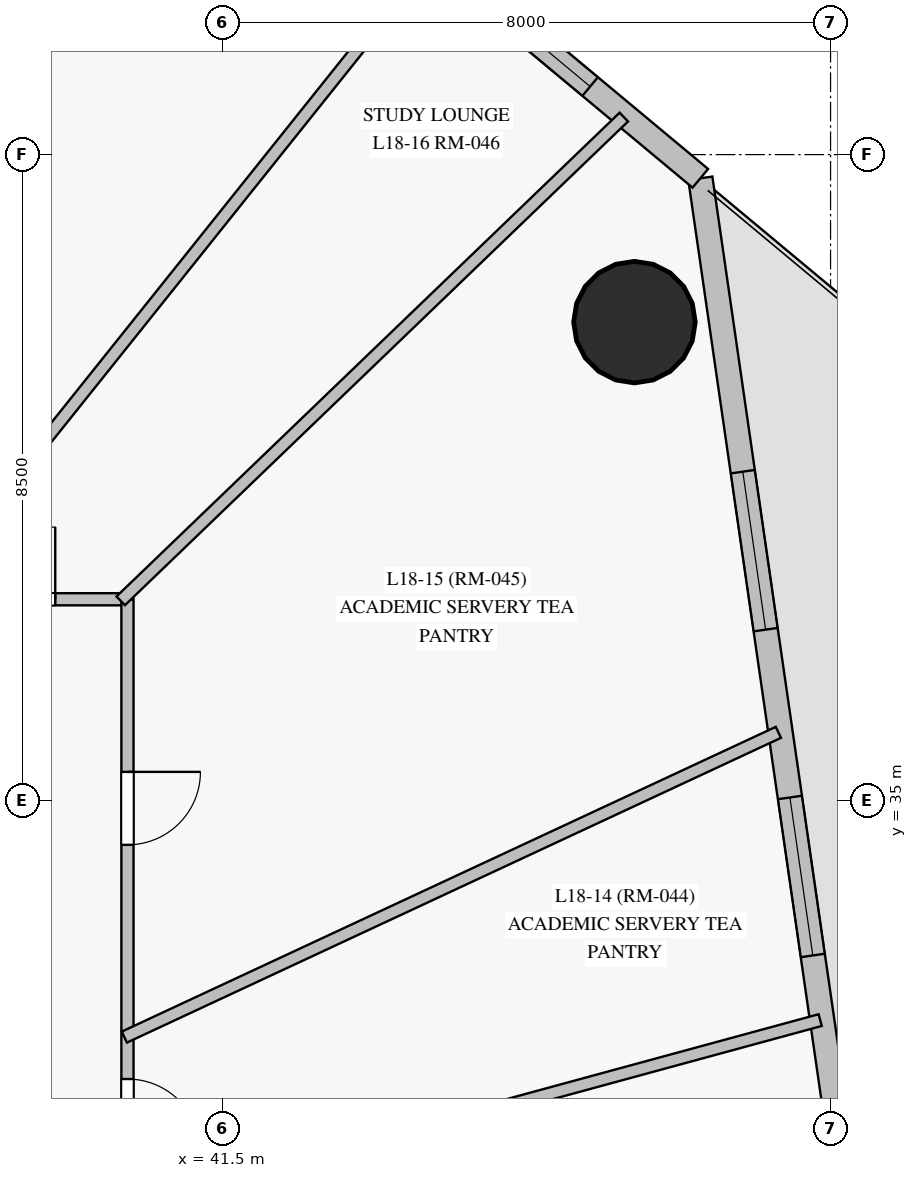
"""IFC4 building model, lengths in metres.
Left out: names, types, materials, properties, quantities, classifications, styles, units other than length and angle.
Written with IfcOpenShell. Run it as: python <this file> out.ifc"""

import sys

from ifc_helpers import new_model, si_unit, direction, frame, frame_2d, origin, origin_with_axes, origin_2d, place, context, subcontext, project, spatial, rectangle, circle, extrude, source, transform, mapped, element, fill, save


model = new_model("IFC4")
c1 = context("Model", 3, precision=1e-05, world=origin(), true_north=direction((0.0, 1.0)))
c2 = subcontext(c1, "Body", "Model", "MODEL_VIEW")
j1 = project(units=[si_unit("LENGTHUNIT", "METRE"), si_unit("PLANEANGLEUNIT", "RADIAN")], contexts=[c1])
p1 = place(None, origin())
s1 = spatial("IfcSite", under=j1, at=p1, CompositionType="ELEMENT")
p2 = place(p1, origin())
s2 = spatial("IfcBuilding", under=s1, at=p2, CompositionType="ELEMENT")
p3 = place(p2, frame((0.0, 0.0, 69.7)))
s3 = spatial("IfcBuildingStorey", under=s2, at=p3, CompositionType="ELEMENT", Elevation=69.7)
m1 = source(origin_with_axes(), c2, "Body", "SweptSolid", [
    extrude(circle(Radius=0.8, at=origin_2d()), origin(), (0.0, 0.0, 1.0), 3.6),
])
p4 = place(p3, frame((46.92, 41.296, 0.0), z_axis=(0.0, 0.0, 1.0), x_axis=(1.0, 0.0, 0.0)))
e1 = element("IfcColumn", 1, at=p4, inside=s3, PredefinedType="COLUMN", context=c2, shape_type="MappedRepresentation", body=[
    mapped(m1, transform((0.0, 0.0, 0.0), scale=1.0)),
])
p5 = place(p3, frame((50.351, 25.464, 0.0), z_axis=(0.0, 0.0, 1.0), x_axis=(-0.14319608419, 0.989694337396, 0.0)))
e2 = element("IfcWall", 2, at=p5, inside=s3, PredefinedType="SOLIDWALL", context=c2, shape_type="SweptSolid", body=[
    extrude(rectangle(XDim=17.909, YDim=0.32, at=frame_2d((8.954, 0.0))), origin(), (0.0, 0.0, 1.0), 3.35),
])
p6 = place(p5, frame((7.578, 0.0, 0.85)))
e3 = element("IfcOpeningElement", 3, at=p6, cuts=e2, PredefinedType="OPENING", context=c2, shape_type="SweptSolid", body=[
    extrude(rectangle(XDim=2.1, YDim=1.95, at=frame_2d((1.05, 0.975))), frame((0.0, 0.17, 0.0), z_axis=(0.0, -1.0, 0.0), x_axis=(1.0, 0.0, 0.0)), (0.0, 0.0, 1.0), 0.34),
])
p7 = place(p5, frame((11.909, 0.0, 0.85)))
e4 = element("IfcOpeningElement", 4, at=p7, cuts=e2, PredefinedType="OPENING", context=c2, shape_type="SweptSolid", body=[
    extrude(rectangle(XDim=2.1, YDim=1.95, at=frame_2d((1.05, 0.975))), frame((0.0, 0.17, 0.0), z_axis=(0.0, -1.0, 0.0), x_axis=(1.0, 0.0, 0.0)), (0.0, 0.0, 1.0), 0.34),
])
p8 = place(p5, frame((1.714, 0.0, 0.0)))
e5 = element("IfcOpeningElement", 5, at=p8, cuts=e2, PredefinedType="OPENING", context=c2, shape_type="SweptSolid", body=[
    extrude(rectangle(XDim=1.05, YDim=2.12, at=frame_2d((0.525, 1.06))), frame((0.0, 0.17, 0.0), z_axis=(0.0, -1.0, 0.0), x_axis=(1.0, 0.0, 0.0)), (0.0, 0.0, 1.0), 0.34),
])
p9 = place(p3, frame((47.787, 43.188, 0.0), z_axis=(0.0, 0.0, 1.0), x_axis=(-0.768362839107, 0.640014490054, 0.0)))
e6 = element("IfcWall", 6, at=p9, inside=s3, PredefinedType="SOLIDWALL", context=c2, shape_type="SweptSolid", body=[
    extrude(rectangle(XDim=7.35, YDim=0.32, at=frame_2d((3.675, 0.0))), origin(), (0.0, 0.0, 1.0), 3.35),
])
p10 = place(p9, frame((1.886, 0.0, 0.85)))
e7 = element("IfcOpeningElement", 7, at=p10, cuts=e6, PredefinedType="OPENING", context=c2, shape_type="SweptSolid", body=[
    extrude(rectangle(XDim=2.1, YDim=1.95, at=frame_2d((1.05, 0.975))), frame((0.0, 0.17, 0.0), z_axis=(0.0, -1.0, 0.0), x_axis=(1.0, 0.0, 0.0)), (0.0, 0.0, 1.0), 0.34),
])
p11 = place(p9, frame((5.035, 0.0, 0.85)))
e8 = element("IfcOpeningElement", 8, at=p11, cuts=e6, PredefinedType="OPENING", context=c2, shape_type="SweptSolid", body=[
    extrude(rectangle(XDim=1.8, YDim=1.85, at=frame_2d((0.9, 0.925))), frame((0.0, 0.17, 0.0), z_axis=(0.0, -1.0, 0.0), x_axis=(1.0, 0.0, 0.0)), (0.0, 0.0, 1.0), 0.34),
])
p12 = place(p3, frame((10.5, 37.65, 0.0), z_axis=(0.0, 0.0, 1.0), x_axis=(1.0, 0.0, 0.0)))
e9 = element("IfcWall", 9, at=p12, inside=s3, PredefinedType="PARTITIONING", context=c2, shape_type="SweptSolid", body=[
    extrude(rectangle(XDim=29.75, YDim=0.16, at=frame_2d((14.875, 0.0))), origin(), (0.0, 0.0, 1.0), 2.75),
])
p13 = place(p12, frame((27.85, 0.0, 0.0)))
e10 = element("IfcOpeningElement", 10, at=p13, cuts=e9, PredefinedType="OPENING", context=c2, shape_type="SweptSolid", body=[
    extrude(rectangle(XDim=0.95, YDim=2.15, at=frame_2d((0.475, 1.075))), frame((0.0, 0.09, 0.0), z_axis=(0.0, -1.0, 0.0), x_axis=(1.0, 0.0, 0.0)), (0.0, 0.0, 1.0), 0.18),
])
p14 = place(p12, frame((25.159, 0.0, 0.0)))
e11 = element("IfcOpeningElement", 11, at=p14, cuts=e9, PredefinedType="OPENING", context=c2, shape_type="SweptSolid", body=[
    extrude(rectangle(XDim=0.96, YDim=2.15, at=frame_2d((0.48, 1.075))), frame((0.0, 0.09, 0.0), z_axis=(0.0, -1.0, 0.0), x_axis=(1.0, 0.0, 0.0)), (0.0, 0.0, 1.0), 0.18),
])
p15 = place(p12, frame((21.837, 0.0, 0.0)))
e12 = element("IfcOpeningElement", 12, at=p15, cuts=e9, PredefinedType="OPENING", context=c2, shape_type="SweptSolid", body=[
    extrude(rectangle(XDim=0.95, YDim=2.15, at=frame_2d((0.475, 1.075))), frame((0.0, 0.09, 0.0), z_axis=(0.0, -1.0, 0.0), x_axis=(1.0, 0.0, 0.0)), (0.0, 0.0, 1.0), 0.18),
])
p16 = place(p12, frame((18.863, 0.0, 0.0)))
e13 = element("IfcOpeningElement", 13, at=p16, cuts=e9, PredefinedType="OPENING", context=c2, shape_type="SweptSolid", body=[
    extrude(rectangle(XDim=0.95, YDim=2.15, at=frame_2d((0.475, 1.075))), frame((0.0, 0.09, 0.0), z_axis=(0.0, -1.0, 0.0), x_axis=(1.0, 0.0, 0.0)), (0.0, 0.0, 1.0), 0.18),
])
p17 = place(p12, frame((15.14, 0.0, 0.0)))
e14 = element("IfcOpeningElement", 14, at=p17, cuts=e9, PredefinedType="OPENING", context=c2, shape_type="SweptSolid", body=[
    extrude(rectangle(XDim=0.96, YDim=2.15, at=frame_2d((0.48, 1.075))), frame((0.0, 0.09, 0.0), z_axis=(0.0, -1.0, 0.0), x_axis=(1.0, 0.0, 0.0)), (0.0, 0.0, 1.0), 0.18),
])
p18 = place(p12, frame((13.174, 0.0, 0.0)))
e15 = element("IfcOpeningElement", 15, at=p18, cuts=e9, PredefinedType="OPENING", context=c2, shape_type="SweptSolid", body=[
    extrude(rectangle(XDim=0.95, YDim=2.15, at=frame_2d((0.475, 1.075))), frame((0.0, 0.09, 0.0), z_axis=(0.0, -1.0, 0.0), x_axis=(1.0, 0.0, 0.0)), (0.0, 0.0, 1.0), 0.18),
])
p19 = place(p12, frame((9.938, 0.0, 0.0)))
e16 = element("IfcOpeningElement", 16, at=p19, cuts=e9, PredefinedType="OPENING", context=c2, shape_type="SweptSolid", body=[
    extrude(rectangle(XDim=0.95, YDim=2.15, at=frame_2d((0.475, 1.075))), frame((0.0, 0.09, 0.0), z_axis=(0.0, -1.0, 0.0), x_axis=(1.0, 0.0, 0.0)), (0.0, 0.0, 1.0), 0.18),
])
p20 = place(p3, frame((40.25, 37.65, 0.0), z_axis=(0.0, 0.0, 1.0), x_axis=(0.0, -1.0, 0.0)))
e17 = element("IfcWall", 17, at=p20, inside=s3, PredefinedType="PARTITIONING", context=c2, shape_type="SweptSolid", body=[
    extrude(rectangle(XDim=22.3, YDim=0.16, at=frame_2d((11.15, 0.0))), origin(), (0.0, 0.0, 1.0), 2.75),
])
p21 = place(p20, frame((14.02, 0.0, 0.0)))
e18 = element("IfcOpeningElement", 18, at=p21, cuts=e17, PredefinedType="OPENING", context=c2, shape_type="SweptSolid", body=[
    extrude(rectangle(XDim=0.96, YDim=2.15, at=frame_2d((0.48, 1.075))), frame((0.0, 0.09, 0.0), z_axis=(0.0, -1.0, 0.0), x_axis=(1.0, 0.0, 0.0)), (0.0, 0.0, 1.0), 0.18),
])
p22 = place(p20, frame((12.253, 0.0, 0.0)))
e19 = element("IfcOpeningElement", 19, at=p22, cuts=e17, PredefinedType="OPENING", context=c2, shape_type="SweptSolid", body=[
    extrude(rectangle(XDim=0.86, YDim=2.1, at=frame_2d((0.43, 1.05))), frame((0.0, 0.09, 0.0), z_axis=(0.0, -1.0, 0.0), x_axis=(1.0, 0.0, 0.0)), (0.0, 0.0, 1.0), 0.18),
])
p23 = place(p20, frame((10.675, 0.0, 0.0)))
e20 = element("IfcOpeningElement", 20, at=p23, cuts=e17, PredefinedType="OPENING", context=c2, shape_type="SweptSolid", body=[
    extrude(rectangle(XDim=0.95, YDim=2.15, at=frame_2d((0.475, 1.075))), frame((0.0, 0.09, 0.0), z_axis=(0.0, -1.0, 0.0), x_axis=(1.0, 0.0, 0.0)), (0.0, 0.0, 1.0), 0.18),
])
p24 = place(p20, frame((6.312, 0.0, 0.0)))
e21 = element("IfcOpeningElement", 21, at=p24, cuts=e17, PredefinedType="OPENING", context=c2, shape_type="SweptSolid", body=[
    extrude(rectangle(XDim=0.96, YDim=2.15, at=frame_2d((0.48, 1.075))), frame((0.0, 0.09, 0.0), z_axis=(0.0, -1.0, 0.0), x_axis=(1.0, 0.0, 0.0)), (0.0, 0.0, 1.0), 0.18),
])
p25 = place(p20, frame((2.271, 0.0, 0.0)))
e22 = element("IfcOpeningElement", 22, at=p25, cuts=e17, PredefinedType="OPENING", context=c2, shape_type="SweptSolid", body=[
    extrude(rectangle(XDim=0.96, YDim=2.15, at=frame_2d((0.48, 1.075))), frame((0.0, 0.09, 0.0), z_axis=(0.0, -1.0, 0.0), x_axis=(1.0, 0.0, 0.0)), (0.0, 0.0, 1.0), 0.18),
])
p26 = place(p3, frame((34.797, 37.611, 0.0), z_axis=(0.0, 0.0, 1.0), x_axis=(0.488974485782, 0.872298086811, 0.0)))
e23 = element("IfcWall", 23, at=p26, inside=s3, PredefinedType="PARTITIONING", context=c2, shape_type="SweptSolid", body=[
    extrude(rectangle(XDim=12.058, YDim=0.16, at=frame_2d((6.029, 0.0))), origin(), (0.0, 0.0, 1.0), 3.35),
])
p27 = place(p26, frame((5.529, 0.0, 0.0)))
e24 = element("IfcOpeningElement", 24, at=p27, cuts=e23, PredefinedType="OPENING", context=c2, shape_type="SweptSolid", body=[
    extrude(rectangle(XDim=0.96, YDim=2.15, at=frame_2d((0.48, 1.075))), frame((0.0, 0.09, 0.0), z_axis=(0.0, -1.0, 0.0), x_axis=(1.0, 0.0, 0.0)), (0.0, 0.0, 1.0), 0.18),
])
p28 = place(p3, frame((37.465, 37.615, 0.0), z_axis=(0.0, 0.0, 1.0), x_axis=(0.624552549849, 0.780982786287, 0.0)))
e25 = element("IfcWall", 25, at=p28, inside=s3, PredefinedType="PARTITIONING", context=c2, shape_type="SweptSolid", body=[
    extrude(rectangle(XDim=10.865, YDim=0.16, at=frame_2d((5.433, 0.0))), origin(), (0.0, 0.0, 1.0), 3.35),
])
p29 = place(p3, frame((40.209, 31.89, 0.0), z_axis=(0.0, 0.0, 1.0), x_axis=(0.906426759987, 0.422363029609, 0.0)))
e26 = element("IfcWall", 26, at=p29, inside=s3, PredefinedType="PARTITIONING", context=c2, shape_type="SweptSolid", body=[
    extrude(rectangle(XDim=9.492, YDim=0.16, at=frame_2d((4.746, 0.0))), origin(), (0.0, 0.0, 1.0), 3.35),
])
p30 = place(p3, frame((40.221, 29.626, 0.0), z_axis=(0.0, 0.0, 1.0), x_axis=(0.96493250171, 0.262498127885, 0.0)))
e27 = element("IfcWall", 27, at=p30, inside=s3, PredefinedType="PARTITIONING", context=c2, shape_type="SweptSolid", body=[
    extrude(rectangle(XDim=9.475, YDim=0.16, at=frame_2d((4.737, 0.0))), origin(), (0.0, 0.0, 1.0), 3.35),
])
p31 = place(p3, frame((40.161, 37.629, 0.0), z_axis=(0.0, 0.0, 1.0), x_axis=(0.720836130308, 0.693105528216, 0.0)))
e28 = element("IfcWall", 28, at=p31, inside=s3, PredefinedType="PARTITIONING", context=c2, shape_type="SweptSolid", body=[
    extrude(rectangle(XDim=9.183, YDim=0.16, at=frame_2d((4.591, 0.0))), origin(), (0.0, 0.0, 1.0), 3.35),
])
m2 = source(origin_with_axes(), c2, "Body", "SweptSolid", [
    extrude(rectangle(XDim=2.1, YDim=1.95, at=frame_2d((1.05, 0.975))), frame((0.0, 0.03, 0.0), z_axis=(0.0, -1.0, 0.0), x_axis=(1.0, 0.0, 0.0)), (0.0, 0.0, 1.0), 0.06),
])
p32 = place(p6, origin())
e29 = element("IfcWindow", 29, at=p32, inside=s3, PartitioningType="SINGLE_PANEL", PredefinedType="WINDOW", context=c2, shape_type="MappedRepresentation", body=[
    mapped(m2, transform((0.0, 0.0, 0.0), scale=1.0)),
])
fill(e3, e29)
p33 = place(p7, origin())
e30 = element("IfcWindow", 30, at=p33, inside=s3, PartitioningType="SINGLE_PANEL", PredefinedType="WINDOW", context=c2, shape_type="MappedRepresentation", body=[
    mapped(m2, transform((0.0, 0.0, 0.0), scale=1.0)),
])
fill(e4, e30)
p34 = place(p10, origin())
e31 = element("IfcWindow", 31, at=p34, inside=s3, PartitioningType="SINGLE_PANEL", PredefinedType="WINDOW", context=c2, shape_type="MappedRepresentation", body=[
    mapped(m2, transform((0.0, 0.0, 0.0), scale=1.0)),
])
fill(e7, e31)
m3 = source(origin_with_axes(), c2, "Body", "SweptSolid", [
    extrude(rectangle(XDim=0.96, YDim=2.15, at=frame_2d((0.48, 1.075))), frame((0.0, 0.025, 0.0), z_axis=(0.0, -1.0, 0.0), x_axis=(1.0, 0.0, 0.0)), (0.0, 0.0, 1.0), 0.05),
])
p35 = place(p24, origin())
e32 = element("IfcDoor", 32, at=p35, inside=s3, OperationType="SINGLE_SWING_RIGHT", PredefinedType="DOOR", context=c2, shape_type="MappedRepresentation", body=[
    mapped(m3, transform((0.0, 0.0, 0.0), scale=1.0)),
])
fill(e21, e32)
p36 = place(p25, origin())
e33 = element("IfcDoor", 33, at=p36, inside=s3, OperationType="SINGLE_SWING_LEFT", PredefinedType="DOOR", context=c2, shape_type="MappedRepresentation", body=[
    mapped(m3, transform((0.0, 0.0, 0.0), scale=1.0)),
])
fill(e22, e33)
m4 = source(origin_with_axes(), c2, "Body", "SweptSolid", [
    extrude(rectangle(XDim=0.95, YDim=2.15, at=frame_2d((0.475, 1.075))), frame((0.0, 0.025, 0.0), z_axis=(0.0, -1.0, 0.0), x_axis=(1.0, 0.0, 0.0)), (0.0, 0.0, 1.0), 0.05),
])
p37 = place(p13, origin())
e34 = element("IfcDoor", 34, at=p37, inside=s3, OperationType="SINGLE_SWING_RIGHT", PredefinedType="DOOR", context=c2, shape_type="MappedRepresentation", body=[
    mapped(m4, transform((0.0, 0.0, 0.0), scale=1.0)),
])
fill(e10, e34)
save(model, sys.argv[1])
